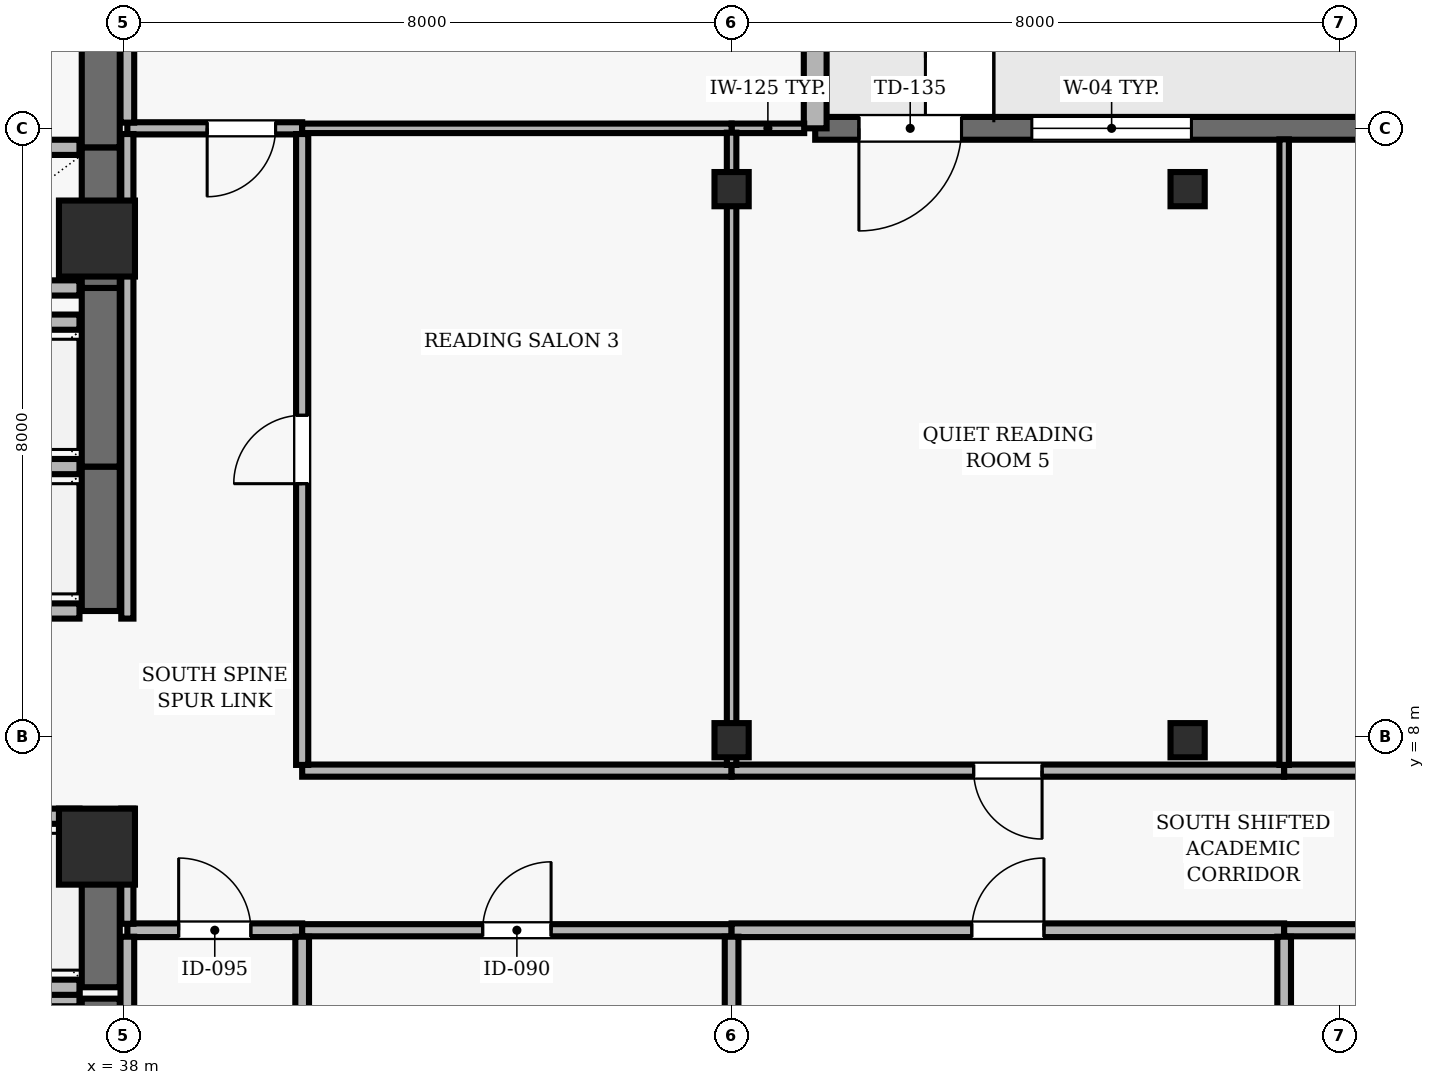
"""IFC4 building model, lengths in metres.
Left out: names, types, materials, properties, quantities, classifications, styles, units other than length and angle.
Written with IfcOpenShell. Run it as: python <this file> out.ifc"""

import sys

from ifc_helpers import new_model, si_unit, direction, frame, frame_2d, origin, origin_2d, place, context, subcontext, project, spatial, rectangle, hollow_rectangle, extrude, element, fill, save


model = new_model("IFC4")
c1 = context("Model", 3, precision=1e-05, world=origin(), true_north=direction((0.0, 1.0)))
c2 = subcontext(c1, "Body", "Model", "MODEL_VIEW")
j1 = project(units=[si_unit("LENGTHUNIT", "METRE"), si_unit("PLANEANGLEUNIT", "RADIAN")], contexts=[c1])
p1 = place(None, origin())
s1 = spatial("IfcSite", under=j1, at=p1, CompositionType="ELEMENT")
p2 = place(p1, origin())
s2 = spatial("IfcBuilding", under=s1, at=p2, CompositionType="ELEMENT")
p3 = place(p2, frame((0.0, 0.0, 195.3)))
s3 = spatial("IfcBuildingStorey", under=s2, at=p3, CompositionType="ELEMENT", Elevation=195.3)
for number, where, z_axis, x_axis in (
    (1, (37.65, 6.55, 0.0), (0.0, 0.0, 1.0), (1.0, 0.0, 0.0)),
    (2, (37.65, 14.55, 0.0), (0.0, 0.0, 1.0), (1.0, 0.0, 0.0)),
):
    element("IfcColumn", number, at=place(p3, frame(where, z_axis=z_axis, x_axis=x_axis)), inside=s3, PredefinedType="COLUMN", context=c2, shape_type="SweptSolid", body=[
        extrude(rectangle(XDim=1.0, YDim=1.0, at=origin_2d()), origin(), (0.0, 0.0, 1.0), 3.9),
    ])
for number, where, z_axis, x_axis in (
    (3, (46.0, 7.95, 0.0), (0.0, 0.0, 1.0), (1.0, 0.0, 0.0)),
    (4, (46.0, 15.2, 0.0), (0.0, 0.0, 1.0), (1.0, 0.0, 0.0)),
    (5, (52.0, 7.95, 0.0), (0.0, 0.0, 1.0), (1.0, 0.0, 0.0)),
    (6, (52.0, 15.2, 0.0), (0.0, 0.0, 1.0), (1.0, 0.0, 0.0)),
):
    element("IfcColumn", number, at=place(p3, frame(where, z_axis=z_axis, x_axis=x_axis)), inside=s3, PredefinedType="COLUMN", context=c2, shape_type="SweptSolid", body=[
        extrude(hollow_rectangle(XDim=0.45, YDim=0.45, WallThickness=0.02, at=origin_2d()), origin(), (0.0, 0.0, 1.0), 3.9),
    ])
p4 = place(p3, frame((62.7, 16.0, 0.0), z_axis=(0.0, 0.0, 1.0), x_axis=(-1.0, 0.0, 0.0)))
e7 = element("IfcWall", 7, at=p4, inside=s3, PredefinedType="SOLIDWALL", context=c2, shape_type="SweptSolid", body=[
    extrude(rectangle(XDim=15.6, YDim=0.3, at=frame_2d((7.8, 0.0))), origin(), (0.0, 0.0, 1.0), 3.69),
])
p5 = place(p4, frame((6.475, 0.0, 0.0)))
e8 = element("IfcOpeningElement", 8, at=p5, cuts=e7, PredefinedType="OPENING", context=c2, shape_type="SweptSolid", body=[
    extrude(rectangle(XDim=1.0, YDim=2.2, at=frame_2d((0.5, 1.1))), frame((0.0, 0.16, 0.0), z_axis=(0.0, -1.0, 0.0), x_axis=(1.0, 0.0, 0.0)), (0.0, 0.0, 1.0), 0.32),
])
p6 = place(p4, frame((13.675, 0.0, 0.0)))
e9 = element("IfcOpeningElement", 9, at=p6, cuts=e7, PredefinedType="OPENING", context=c2, shape_type="SweptSolid", body=[
    extrude(rectangle(XDim=1.35, YDim=2.2, at=frame_2d((0.675, 1.1))), frame((0.0, 0.16, 0.0), z_axis=(0.0, -1.0, 0.0), x_axis=(1.0, 0.0, 0.0)), (0.0, 0.0, 1.0), 0.32),
])
p7 = place(p4, frame((10.65, 0.0, 0.9)))
e10 = element("IfcOpeningElement", 10, at=p7, cuts=e7, PredefinedType="OPENING", context=c2, shape_type="SweptSolid", body=[
    extrude(rectangle(XDim=2.1, YDim=1.6, at=frame_2d((1.05, 0.8))), frame((0.0, 0.16, 0.0), z_axis=(0.0, -1.0, 0.0), x_axis=(1.0, 0.0, 0.0)), (0.0, 0.0, 1.0), 0.32),
])
p8 = place(p3, frame((47.1, 16.0, 0.0), z_axis=(0.0, 0.0, 1.0), x_axis=(0.0, 1.0, 0.0)))
e11 = element("IfcWall", 11, at=p8, inside=s3, PredefinedType="SOLIDWALL", context=c2, shape_type="SweptSolid", body=[
    extrude(rectangle(XDim=6.135, YDim=0.3, at=frame_2d((3.067, 0.0))), origin(), (0.0, 0.0, 1.0), 3.69),
])
p9 = place(p8, frame((1.868, 0.0, 0.9)))
e12 = element("IfcOpeningElement", 12, at=p9, cuts=e11, PredefinedType="OPENING", context=c2, shape_type="SweptSolid", body=[
    extrude(rectangle(XDim=2.4, YDim=1.6, at=frame_2d((1.2, 0.8))), frame((0.0, 0.16, 0.0), z_axis=(0.0, -1.0, 0.0), x_axis=(1.0, 0.0, 0.0)), (0.0, 0.0, 1.0), 0.32),
])
p10 = place(p3, frame((37.7, 2.45, 0.0), z_axis=(0.0, 0.0, 1.0), x_axis=(0.0, 1.0, 0.0)))
e13 = element("IfcWall", 13, at=p10, inside=s3, PredefinedType="SHEAR", context=c2, shape_type="SweptSolid", body=[
    extrude(rectangle(XDim=2.1, YDim=0.5, at=frame_2d((1.05, 0.0))), origin(), (0.0, 0.0, 1.0), 3.69),
])
p11 = place(p3, frame((37.42, 4.55, 0.0), z_axis=(0.0, 0.0, 1.0), x_axis=(-1.0, 0.0, 0.0)))
e14 = element("IfcWall", 14, at=p11, inside=s3, PredefinedType="SOLIDWALL", context=c2, shape_type="SweptSolid", body=[
    extrude(rectangle(XDim=2.14, YDim=0.2, at=frame_2d((1.07, 0.0))), origin(), (0.0, 0.0, 1.0), 3.69),
])
p12 = place(p3, frame((37.7, 4.7, 0.0), z_axis=(0.0, 0.0, 1.0), x_axis=(0.0, 1.0, 0.0)))
e15 = element("IfcWall", 15, at=p12, inside=s3, PredefinedType="SHEAR", context=c2, shape_type="SweptSolid", body=[
    extrude(rectangle(XDim=2.25, YDim=0.5, at=frame_2d((1.125, 0.0))), origin(), (0.0, 0.0, 1.0), 3.69),
])
for number, where, z_axis, x_axis in (
    (16, (35.28, 4.7, 0.0), (0.0, 0.0, 1.0), (1.0, 0.0, 0.0)),
    (17, (37.42, 6.95, 0.0), (0.0, 0.0, 1.0), (-1.0, 0.0, 0.0)),
):
    element("IfcWall", number, at=place(p3, frame(where, z_axis=z_axis, x_axis=x_axis)), inside=s3, PredefinedType="SOLIDWALL", context=c2, shape_type="SweptSolid", body=[
        extrude(rectangle(XDim=2.14, YDim=0.2, at=frame_2d((1.07, 0.0))), origin(), (0.0, 0.0, 1.0), 3.69),
    ])
p13 = place(p3, frame((37.7, 9.65, 0.0), z_axis=(0.0, 0.0, 1.0), x_axis=(0.0, 1.0, 0.0)))
e18 = element("IfcWall", 18, at=p13, inside=s3, PredefinedType="SHEAR", context=c2, shape_type="SweptSolid", body=[
    extrude(rectangle(XDim=1.9, YDim=0.5, at=frame_2d((0.95, 0.0))), origin(), (0.0, 0.0, 1.0), 3.69),
])
for number, where, z_axis, x_axis in (
    (19, (35.28, 9.65, 0.0), (0.0, 0.0, 1.0), (1.0, 0.0, 0.0)),
    (20, (37.42, 11.55, 0.0), (0.0, 0.0, 1.0), (-1.0, 0.0, 0.0)),
):
    element("IfcWall", number, at=place(p3, frame(where, z_axis=z_axis, x_axis=x_axis)), inside=s3, PredefinedType="SOLIDWALL", context=c2, shape_type="SweptSolid", body=[
        extrude(rectangle(XDim=2.14, YDim=0.2, at=frame_2d((1.07, 0.0))), origin(), (0.0, 0.0, 1.0), 3.69),
    ])
p14 = place(p3, frame((37.7, 11.55, 0.0), z_axis=(0.0, 0.0, 1.0), x_axis=(0.0, 1.0, 0.0)))
e21 = element("IfcWall", 21, at=p14, inside=s3, PredefinedType="SHEAR", context=c2, shape_type="SweptSolid", body=[
    extrude(rectangle(XDim=2.35, YDim=0.5, at=frame_2d((1.175, 0.0))), origin(), (0.0, 0.0, 1.0), 3.69),
])
p15 = place(p3, frame((37.42, 13.45, 0.0), z_axis=(0.0, 0.0, 1.0), x_axis=(-1.0, 0.0, 0.0)))
e22 = element("IfcWall", 22, at=p15, inside=s3, PredefinedType="SOLIDWALL", context=c2, shape_type="SweptSolid", body=[
    extrude(rectangle(XDim=2.14, YDim=0.2, at=frame_2d((1.07, 0.0))), origin(), (0.0, 0.0, 1.0), 3.69),
])
p16 = place(p3, frame((37.7, 13.9, 0.0), z_axis=(0.0, 0.0, 1.0), x_axis=(0.0, 1.0, 0.0)))
e23 = element("IfcWall", 23, at=p16, inside=s3, PredefinedType="SHEAR", context=c2, shape_type="SweptSolid", body=[
    extrude(rectangle(XDim=1.85, YDim=0.5, at=frame_2d((0.925, 0.0))), origin(), (0.0, 0.0, 1.0), 3.69),
])
for number, where, z_axis, x_axis in (
    (24, (35.28, 13.9, 0.0), (0.0, 0.0, 1.0), (1.0, 0.0, 0.0)),
    (25, (37.42, 15.75, 0.0), (0.0, 0.0, 1.0), (-1.0, 0.0, 0.0)),
):
    element("IfcWall", number, at=place(p3, frame(where, z_axis=z_axis, x_axis=x_axis)), inside=s3, PredefinedType="SOLIDWALL", context=c2, shape_type="SweptSolid", body=[
        extrude(rectangle(XDim=2.14, YDim=0.2, at=frame_2d((1.07, 0.0))), origin(), (0.0, 0.0, 1.0), 3.69),
    ])
p17 = place(p3, frame((37.7, 15.75, 0.0), z_axis=(0.0, 0.0, 1.0), x_axis=(0.0, 1.0, 0.0)))
e26 = element("IfcWall", 26, at=p17, inside=s3, PredefinedType="SHEAR", context=c2, shape_type="SweptSolid", body=[
    extrude(rectangle(XDim=1.85, YDim=0.5, at=frame_2d((0.925, 0.0))), origin(), (0.0, 0.0, 1.0), 3.69),
])
p18 = place(p3, frame((38.05, 5.45, 0.0), z_axis=(0.0, 0.0, 1.0), x_axis=(1.0, 0.0, 0.0)))
e27 = element("IfcWall", 27, at=p18, inside=s3, PredefinedType="PARTITIONING", context=c2, shape_type="SweptSolid", body=[
    extrude(rectangle(XDim=2.3, YDim=0.18, at=frame_2d((1.15, 0.0))), origin(), (0.0, 0.0, 1.0), 3.372),
])
p19 = place(p18, frame((0.675, 0.0, 0.0)))
e28 = element("IfcOpeningElement", 28, at=p19, cuts=e27, PredefinedType="OPENING", context=c2, shape_type="SweptSolid", body=[
    extrude(rectangle(XDim=0.95, YDim=2.1, at=frame_2d((0.475, 1.05))), frame((0.0, 0.1, 0.0), z_axis=(0.0, -1.0, 0.0), x_axis=(1.0, 0.0, 0.0)), (0.0, 0.0, 1.0), 0.2),
])
p20 = place(p3, frame((40.35, 5.45, 0.0), z_axis=(0.0, 0.0, 1.0), x_axis=(1.0, 0.0, 0.0)))
e29 = element("IfcWall", 29, at=p20, inside=s3, PredefinedType="PARTITIONING", context=c2, shape_type="SweptSolid", body=[
    extrude(rectangle(XDim=5.65, YDim=0.16, at=frame_2d((2.825, 0.0))), origin(), (0.0, 0.0, 1.0), 3.372),
])
p21 = place(p20, frame((2.375, 0.0, 0.0)))
e30 = element("IfcOpeningElement", 30, at=p21, cuts=e29, PredefinedType="OPENING", context=c2, shape_type="SweptSolid", body=[
    extrude(rectangle(XDim=0.9, YDim=2.1, at=frame_2d((0.45, 1.05))), frame((0.0, 0.09, 0.0), z_axis=(0.0, -1.0, 0.0), x_axis=(1.0, 0.0, 0.0)), (0.0, 0.0, 1.0), 0.18),
])
p22 = place(p3, frame((40.35, 16.0, 0.0), z_axis=(0.0, 0.0, 1.0), x_axis=(-1.0, 0.0, 0.0)))
e31 = element("IfcWall", 31, at=p22, inside=s3, PredefinedType="PARTITIONING", context=c2, shape_type="SweptSolid", body=[
    extrude(rectangle(XDim=2.3, YDim=0.16, at=frame_2d((1.15, 0.0))), origin(), (0.0, 0.0, 1.0), 3.69),
])
p23 = place(p22, frame((0.35, 0.0, 0.0)))
e32 = element("IfcOpeningElement", 32, at=p23, cuts=e31, PredefinedType="OPENING", context=c2, shape_type="SweptSolid", body=[
    extrude(rectangle(XDim=0.9, YDim=2.1, at=frame_2d((0.45, 1.05))), frame((0.0, 0.09, 0.0), z_axis=(0.0, -1.0, 0.0), x_axis=(1.0, 0.0, 0.0)), (0.0, 0.0, 1.0), 0.18),
])
p24 = place(p3, frame((46.0, 5.45, 0.0), z_axis=(0.0, 0.0, 1.0), x_axis=(1.0, 0.0, 0.0)))
e33 = element("IfcWall", 33, at=p24, inside=s3, PredefinedType="PARTITIONING", context=c2, shape_type="SweptSolid", body=[
    extrude(rectangle(XDim=7.27, YDim=0.18, at=frame_2d((3.635, 0.0))), origin(), (0.0, 0.0, 1.0), 3.372),
])
p25 = place(p24, frame((3.16, 0.0, 0.0)))
e34 = element("IfcOpeningElement", 34, at=p25, cuts=e33, PredefinedType="OPENING", context=c2, shape_type="SweptSolid", body=[
    extrude(rectangle(XDim=0.95, YDim=2.1, at=frame_2d((0.475, 1.05))), frame((0.0, 0.1, 0.0), z_axis=(0.0, -1.0, 0.0), x_axis=(1.0, 0.0, 0.0)), (0.0, 0.0, 1.0), 0.2),
])
p26 = place(p3, frame((46.0, 7.55, 0.0), z_axis=(0.0, 0.0, 1.0), x_axis=(-1.0, 0.0, 0.0)))
e35 = element("IfcWall", 35, at=p26, inside=s3, PredefinedType="PARTITIONING", context=c2, shape_type="SweptSolid", body=[
    extrude(rectangle(XDim=5.65, YDim=0.16, at=frame_2d((2.825, 0.0))), origin(), (0.0, 0.0, 1.0), 3.146),
])
p27 = place(p3, frame((46.0, 16.0, 0.0), z_axis=(0.0, 0.0, 1.0), x_axis=(1.0, 0.0, 0.0)))
e36 = element("IfcWall", 36, at=p27, inside=s3, PredefinedType="PARTITIONING", context=c2, shape_type="SweptSolid", body=[
    extrude(rectangle(XDim=0.955, YDim=0.125, at=frame_2d((0.478, 0.0))), origin(), (0.0, 0.0, 1.0), 3.39),
])
p28 = place(p3, frame((46.0, 16.0, 0.0), z_axis=(0.0, 0.0, 1.0), x_axis=(-1.0, 0.0, 0.0)))
e37 = element("IfcWall", 37, at=p28, inside=s3, PredefinedType="PARTITIONING", context=c2, shape_type="SweptSolid", body=[
    extrude(rectangle(XDim=5.65, YDim=0.125, at=frame_2d((2.825, 0.0))), origin(), (0.0, 0.0, 1.0), 3.69),
])
p29 = place(p3, frame((53.27, 5.45, 0.0), z_axis=(0.0, 0.0, 1.0), x_axis=(1.0, 0.0, 0.0)))
e38 = element("IfcWall", 38, at=p29, inside=s3, PredefinedType="PARTITIONING", context=c2, shape_type="SweptSolid", body=[
    extrude(rectangle(XDim=6.21, YDim=0.16, at=frame_2d((3.105, 0.0))), origin(), (0.0, 0.0, 1.0), 3.372),
])
p30 = place(p29, frame((2.655, 0.0, 0.0)))
e39 = element("IfcOpeningElement", 39, at=p30, cuts=e38, PredefinedType="OPENING", context=c2, shape_type="SweptSolid", body=[
    extrude(rectangle(XDim=0.9, YDim=2.1, at=frame_2d((0.45, 1.05))), frame((0.0, 0.09, 0.0), z_axis=(0.0, -1.0, 0.0), x_axis=(1.0, 0.0, 0.0)), (0.0, 0.0, 1.0), 0.18),
])
p31 = place(p3, frame((53.27, 7.55, 0.0), z_axis=(0.0, 0.0, 1.0), x_axis=(-1.0, 0.0, 0.0)))
e40 = element("IfcWall", 40, at=p31, inside=s3, PredefinedType="PARTITIONING", context=c2, shape_type="SweptSolid", body=[
    extrude(rectangle(XDim=7.27, YDim=0.16, at=frame_2d((3.635, 0.0))), origin(), (0.0, 0.0, 1.0), 3.146),
])
p32 = place(p31, frame((3.185, 0.0, 0.0)))
e41 = element("IfcOpeningElement", 41, at=p32, cuts=e40, PredefinedType="OPENING", context=c2, shape_type="SweptSolid", body=[
    extrude(rectangle(XDim=0.9, YDim=2.1, at=frame_2d((0.45, 1.05))), frame((0.0, 0.09, 0.0), z_axis=(0.0, -1.0, 0.0), x_axis=(1.0, 0.0, 0.0)), (0.0, 0.0, 1.0), 0.18),
])
p33 = place(p3, frame((59.48, 7.55, 0.0), z_axis=(0.0, 0.0, 1.0), x_axis=(-1.0, 0.0, 0.0)))
e42 = element("IfcWall", 42, at=p33, inside=s3, PredefinedType="PARTITIONING", context=c2, shape_type="SweptSolid", body=[
    extrude(rectangle(XDim=6.21, YDim=0.16, at=frame_2d((3.105, 0.0))), origin(), (0.0, 0.0, 1.0), 3.146),
])
p34 = place(p33, frame((3.355, 0.0, 0.0)))
e43 = element("IfcOpeningElement", 43, at=p34, cuts=e42, PredefinedType="OPENING", context=c2, shape_type="SweptSolid", body=[
    extrude(rectangle(XDim=0.9, YDim=2.1, at=frame_2d((0.45, 1.05))), frame((0.0, 0.09, 0.0), z_axis=(0.0, -1.0, 0.0), x_axis=(1.0, 0.0, 0.0)), (0.0, 0.0, 1.0), 0.18),
])
p35 = place(p3, frame((38.05, 5.365, 0.0), z_axis=(0.0, 0.0, 1.0), x_axis=(0.0, -1.0, 0.0)))
e44 = element("IfcWall", 44, at=p35, inside=s3, PredefinedType="PARTITIONING", context=c2, shape_type="SweptSolid", body=[
    extrude(rectangle(XDim=5.22, YDim=0.18, at=frame_2d((2.61, 0.0))), origin(), (0.0, 0.0, 1.0), 3.146),
])
p36 = place(p3, frame((38.05, 7.05, 0.0), z_axis=(0.0, 0.0, 1.0), x_axis=(0.0, -1.0, 0.0)))
e45 = element("IfcWall", 45, at=p36, inside=s3, PredefinedType="PARTITIONING", context=c2, shape_type="SweptSolid", body=[
    extrude(rectangle(XDim=1.515, YDim=0.16, at=frame_2d((0.758, 0.0))), origin(), (0.0, 0.0, 1.0), 3.146),
])
p37 = place(p3, frame((38.05, 15.925, 0.0), z_axis=(0.0, 0.0, 1.0), x_axis=(0.0, -1.0, 0.0)))
e46 = element("IfcWall", 46, at=p37, inside=s3, PredefinedType="PARTITIONING", context=c2, shape_type="SweptSolid", body=[
    extrude(rectangle(XDim=6.375, YDim=0.16, at=frame_2d((3.188, 0.0))), origin(), (0.0, 0.0, 1.0), 3.146),
])
p38 = place(p3, frame((38.05, 23.19, 0.0), z_axis=(0.0, 0.0, 1.0), x_axis=(0.0, -1.0, 0.0)))
e47 = element("IfcWall", 47, at=p38, inside=s3, PredefinedType="PARTITIONING", context=c2, shape_type="SweptSolid", body=[
    extrude(rectangle(XDim=7.115, YDim=0.18, at=frame_2d((3.558, 0.0))), origin(), (0.0, 0.0, 1.0), 3.146),
])
p39 = place(p3, frame((40.35, 0.145, 0.0), z_axis=(0.0, 0.0, 1.0), x_axis=(0.0, 1.0, 0.0)))
e48 = element("IfcWall", 48, at=p39, inside=s3, PredefinedType="PARTITIONING", context=c2, shape_type="SweptSolid", body=[
    extrude(rectangle(XDim=5.22, YDim=0.18, at=frame_2d((2.61, 0.0))), origin(), (0.0, 0.0, 1.0), 3.69),
])
p40 = place(p3, frame((40.35, 7.625, 0.0), z_axis=(0.0, 0.0, 1.0), x_axis=(0.0, 1.0, 0.0)))
e49 = element("IfcWall", 49, at=p40, inside=s3, PredefinedType="PARTITIONING", context=c2, shape_type="SweptSolid", body=[
    extrude(rectangle(XDim=8.3, YDim=0.16, at=frame_2d((4.15, 0.0))), origin(), (0.0, 0.0, 1.0), 3.372),
])
p41 = place(p40, frame((3.7, 0.0, 0.0)))
e50 = element("IfcOpeningElement", 50, at=p41, cuts=e49, PredefinedType="OPENING", context=c2, shape_type="SweptSolid", body=[
    extrude(rectangle(XDim=0.9, YDim=2.1, at=frame_2d((0.45, 1.05))), frame((0.0, 0.09, 0.0), z_axis=(0.0, -1.0, 0.0), x_axis=(1.0, 0.0, 0.0)), (0.0, 0.0, 1.0), 0.18),
])
p42 = place(p3, frame((46.0, 0.145, 0.0), z_axis=(0.0, 0.0, 1.0), x_axis=(0.0, 1.0, 0.0)))
e51 = element("IfcWall", 51, at=p42, inside=s3, PredefinedType="PARTITIONING", context=c2, shape_type="SweptSolid", body=[
    extrude(rectangle(XDim=5.22, YDim=0.18, at=frame_2d((2.61, 0.0))), origin(), (0.0, 0.0, 1.0), 3.146),
])
p43 = place(p3, frame((46.0, 7.625, 0.0), z_axis=(0.0, 0.0, 1.0), x_axis=(0.0, 1.0, 0.0)))
e52 = element("IfcWall", 52, at=p43, inside=s3, PredefinedType="PARTITIONING", context=c2, shape_type="SweptSolid", body=[
    extrude(rectangle(XDim=8.318, YDim=0.125, at=frame_2d((4.159, 0.0))), origin(), (0.0, 0.0, 1.0), 3.146),
])
p44 = place(p3, frame((53.27, 0.145, 0.0), z_axis=(0.0, 0.0, 1.0), x_axis=(0.0, 1.0, 0.0)))
e53 = element("IfcWall", 53, at=p44, inside=s3, PredefinedType="PARTITIONING", context=c2, shape_type="SweptSolid", body=[
    extrude(rectangle(XDim=5.22, YDim=0.18, at=frame_2d((2.61, 0.0))), origin(), (0.0, 0.0, 1.0), 3.69),
])
p45 = place(p3, frame((53.27, 7.625, 0.0), z_axis=(0.0, 0.0, 1.0), x_axis=(0.0, 1.0, 0.0)))
e54 = element("IfcWall", 54, at=p45, inside=s3, PredefinedType="PARTITIONING", context=c2, shape_type="SweptSolid", body=[
    extrude(rectangle(XDim=8.23, YDim=0.125, at=frame_2d((4.115, 0.0))), origin(), (0.0, 0.0, 1.0), 3.69),
])
p46 = place(p6, origin())
e55 = element("IfcDoor", 55, at=p46, inside=s3, OperationType="SINGLE_SWING_RIGHT", PredefinedType="DOOR", context=c2, shape_type="SweptSolid", body=[
    extrude(rectangle(XDim=1.35, YDim=2.2, at=frame_2d((0.675, 1.1))), frame((0.0, 0.025, 0.0), z_axis=(0.0, -1.0, 0.0), x_axis=(1.0, 0.0, 0.0)), (0.0, 0.0, 1.0), 0.05),
])
fill(e9, e55)
p47 = place(p7, origin())
e56 = element("IfcWindow", 56, at=p47, inside=s3, PartitioningType="SINGLE_PANEL", PredefinedType="WINDOW", context=c2, shape_type="SweptSolid", body=[
    extrude(rectangle(XDim=2.1, YDim=1.6, at=frame_2d((1.05, 0.8))), frame((0.0, 0.03, 0.0), z_axis=(0.0, -1.0, 0.0), x_axis=(1.0, 0.0, 0.0)), (0.0, 0.0, 1.0), 0.06),
])
fill(e10, e56)
p48 = place(p19, origin())
e57 = element("IfcDoor", 57, at=p48, inside=s3, OperationType="SINGLE_SWING_LEFT", PredefinedType="DOOR", context=c2, shape_type="SweptSolid", body=[
    extrude(rectangle(XDim=0.95, YDim=2.1, at=frame_2d((0.475, 1.05))), frame((0.0, 0.025, 0.0), z_axis=(0.0, -1.0, 0.0), x_axis=(1.0, 0.0, 0.0)), (0.0, 0.0, 1.0), 0.05),
])
fill(e28, e57)
p49 = place(p21, origin())
e58 = element("IfcDoor", 58, at=p49, inside=s3, OperationType="SINGLE_SWING_RIGHT", PredefinedType="DOOR", context=c2, shape_type="SweptSolid", body=[
    extrude(rectangle(XDim=0.9, YDim=2.1, at=frame_2d((0.45, 1.05))), frame((0.0, 0.025, 0.0), z_axis=(0.0, -1.0, 0.0), x_axis=(1.0, 0.0, 0.0)), (0.0, 0.0, 1.0), 0.05),
])
fill(e30, e58)
p50 = place(p41, origin())
e59 = element("IfcDoor", 59, at=p50, inside=s3, OperationType="SINGLE_SWING_LEFT", PredefinedType="DOOR", context=c2, shape_type="SweptSolid", body=[
    extrude(rectangle(XDim=0.9, YDim=2.1, at=frame_2d((0.45, 1.05))), frame((0.0, 0.025, 0.0), z_axis=(0.0, -1.0, 0.0), x_axis=(1.0, 0.0, 0.0)), (0.0, 0.0, 1.0), 0.05),
])
fill(e50, e59)
p51 = place(p25, origin())
e60 = element("IfcDoor", 60, at=p51, inside=s3, OperationType="SINGLE_SWING_RIGHT", PredefinedType="DOOR", context=c2, shape_type="SweptSolid", body=[
    extrude(rectangle(XDim=0.95, YDim=2.1, at=frame_2d((0.475, 1.05))), frame((0.0, 0.025, 0.0), z_axis=(0.0, -1.0, 0.0), x_axis=(1.0, 0.0, 0.0)), (0.0, 0.0, 1.0), 0.05),
])
fill(e34, e60)
p52 = place(p32, origin())
e61 = element("IfcDoor", 61, at=p52, inside=s3, OperationType="SINGLE_SWING_LEFT", PredefinedType="DOOR", context=c2, shape_type="SweptSolid", body=[
    extrude(rectangle(XDim=0.9, YDim=2.1, at=frame_2d((0.45, 1.05))), frame((0.0, 0.025, 0.0), z_axis=(0.0, -1.0, 0.0), x_axis=(1.0, 0.0, 0.0)), (0.0, 0.0, 1.0), 0.05),
])
fill(e41, e61)
p53 = place(p23, origin())
e62 = element("IfcDoor", 62, at=p53, inside=s3, OperationType="SINGLE_SWING_RIGHT", PredefinedType="DOOR", context=c2, shape_type="SweptSolid", body=[
    extrude(rectangle(XDim=0.9, YDim=2.1, at=frame_2d((0.45, 1.05))), frame((0.0, 0.025, 0.0), z_axis=(0.0, -1.0, 0.0), x_axis=(1.0, 0.0, 0.0)), (0.0, 0.0, 1.0), 0.05),
])
fill(e32, e62)
save(model, sys.argv[1])
